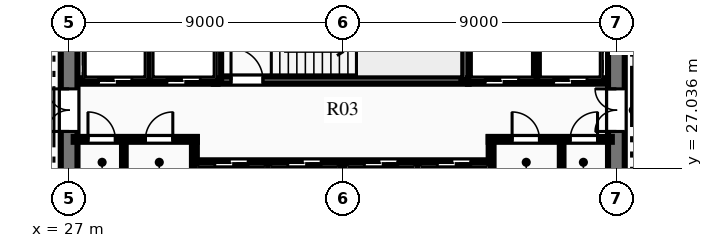
"""IFC4 building model, lengths in metres.
Left out: names, types, materials, properties, quantities, classifications, styles, units other than length and angle.
Written with IfcOpenShell. Run it as: python <this file> out.ifc"""

import sys

from ifc_helpers import new_model, si_unit, direction, frame, frame_2d, origin, place, context, subcontext, project, spatial, rectangle, extrude, element, fill, save


model = new_model("IFC4")
c1 = context("Model", 3, precision=1e-05, world=origin(), true_north=direction((0.0, 1.0)))
c2 = subcontext(c1, "Body", "Model", "MODEL_VIEW")
j1 = project(units=[si_unit("LENGTHUNIT", "METRE"), si_unit("PLANEANGLEUNIT", "RADIAN")], contexts=[c1])
p1 = place(None, origin())
s1 = spatial("IfcSite", under=j1, at=p1, CompositionType="ELEMENT")
p2 = place(p1, origin())
s2 = spatial("IfcBuilding", under=s1, at=p2, CompositionType="ELEMENT")
p3 = place(p2, frame((0.0, 0.0, 90.45)))
s3 = spatial("IfcBuildingStorey", under=s2, at=p3, CompositionType="ELEMENT", Elevation=90.45)
p4 = place(p3, frame((27.0, 18.275, 0.0), z_axis=(0.0, 0.0, 1.0), x_axis=(0.0, 1.0, 0.0)))
e1 = element("IfcWall", 1, at=p4, inside=s3, PredefinedType="SHEAR", context=c2, shape_type="SweptSolid", body=[
    extrude(rectangle(XDim=15.45, YDim=0.55, at=frame_2d((7.725, 0.0))), origin(), (0.0, 0.0, 1.0), 3.75),
])
p5 = place(p4, frame((9.965, 0.0, 0.0)))
e2 = element("IfcOpeningElement", 2, at=p5, cuts=e1, PredefinedType="OPENING", context=c2, shape_type="SweptSolid", body=[
    extrude(rectangle(XDim=1.4, YDim=2.2, at=frame_2d((0.7, 1.1))), frame((0.0, 0.285, 0.0), z_axis=(0.0, -1.0, 0.0), x_axis=(1.0, 0.0, 0.0)), (0.0, 0.0, 1.0), 0.57),
])
p6 = place(p3, frame((45.0, 18.275, 0.0), z_axis=(0.0, 0.0, 1.0), x_axis=(0.0, 1.0, 0.0)))
e3 = element("IfcWall", 3, at=p6, inside=s3, PredefinedType="SHEAR", context=c2, shape_type="SweptSolid", body=[
    extrude(rectangle(XDim=15.45, YDim=0.55, at=frame_2d((7.725, 0.0))), origin(), (0.0, 0.0, 1.0), 3.75),
])
p7 = place(p6, frame((9.965, 0.0, 0.0)))
e4 = element("IfcOpeningElement", 4, at=p7, cuts=e3, PredefinedType="OPENING", context=c2, shape_type="SweptSolid", body=[
    extrude(rectangle(XDim=1.4, YDim=2.2, at=frame_2d((0.7, 1.1))), frame((0.0, 0.285, 0.0), z_axis=(0.0, -1.0, 0.0), x_axis=(1.0, 0.0, 0.0)), (0.0, 0.0, 1.0), 0.57),
])
p8 = place(p3, frame((31.76, 29.93, 0.0), z_axis=(0.0, 0.0, 1.0), x_axis=(1.0, 0.0, 0.0)))
e5 = element("IfcWall", 5, at=p8, inside=s3, PredefinedType="SHEAR", context=c2, shape_type="SweptSolid", body=[
    extrude(rectangle(XDim=8.38, YDim=0.24, at=frame_2d((4.19, 0.0))), origin(), (0.0, 0.0, 1.0), 3.75),
])
p9 = place(p8, frame((0.565, 0.0, 0.0)))
e6 = element("IfcOpeningElement", 6, at=p9, cuts=e5, PredefinedType="OPENING", context=c2, shape_type="SweptSolid", body=[
    extrude(rectangle(XDim=1.05, YDim=2.15, at=frame_2d((0.525, 1.075))), frame((0.0, 0.13, 0.0), z_axis=(0.0, -1.0, 0.0), x_axis=(1.0, 0.0, 0.0)), (0.0, 0.0, 1.0), 0.26),
])
p10 = place(p3, frame((31.88, 29.93, 0.0), z_axis=(0.0, 0.0, 1.0), x_axis=(0.0, 1.0, 0.0)))
e7 = element("IfcWall", 7, at=p10, inside=s3, PredefinedType="SHEAR", context=c2, shape_type="SweptSolid", body=[
    extrude(rectangle(XDim=3.79, YDim=0.24, at=frame_2d((1.895, 0.0))), origin(), (0.0, 0.0, 1.0), 3.75),
])
p11 = place(p3, frame((40.02, 29.93, 0.0), z_axis=(0.0, 0.0, 1.0), x_axis=(0.0, 1.0, 0.0)))
e8 = element("IfcWall", 8, at=p11, inside=s3, PredefinedType="SHEAR", context=c2, shape_type="SweptSolid", body=[
    extrude(rectangle(XDim=3.85, YDim=0.24, at=frame_2d((1.925, 0.0))), origin(), (0.0, 0.0, 1.0), 3.75),
])
p12 = place(p3, frame((27.15, 27.98, 0.0), z_axis=(0.0, 0.0, 1.0), x_axis=(1.0, 0.0, 0.0)))
e9 = element("IfcWall", 9, at=p12, inside=s3, PredefinedType="PARTITIONING", context=c2, shape_type="SweptSolid", body=[
    extrude(rectangle(XDim=4.05, YDim=0.16, at=frame_2d((2.025, 0.0))), origin(), (0.0, 0.0, 1.0), 3.45),
])
p13 = place(p12, frame((0.47, 0.0, 0.0)))
e10 = element("IfcOpeningElement", 10, at=p13, cuts=e9, PredefinedType="OPENING", context=c2, shape_type="SweptSolid", body=[
    extrude(rectangle(XDim=0.9, YDim=2.15, at=frame_2d((0.45, 1.075))), frame((0.0, 0.09, 0.0), z_axis=(0.0, -1.0, 0.0), x_axis=(1.0, 0.0, 0.0)), (0.0, 0.0, 1.0), 0.18),
])
p14 = place(p12, frame((2.36, 0.0, 0.0)))
e11 = element("IfcOpeningElement", 11, at=p14, cuts=e9, PredefinedType="OPENING", context=c2, shape_type="SweptSolid", body=[
    extrude(rectangle(XDim=0.9, YDim=2.15, at=frame_2d((0.45, 1.075))), frame((0.0, 0.09, 0.0), z_axis=(0.0, -1.0, 0.0), x_axis=(1.0, 0.0, 0.0)), (0.0, 0.0, 1.0), 0.18),
])
p15 = place(p3, frame((31.12, 26.54, 0.0), z_axis=(0.0, 0.0, 1.0), x_axis=(0.0, 1.0, 0.0)))
e12 = element("IfcWall", 12, at=p15, inside=s3, PredefinedType="PARTITIONING", context=c2, shape_type="SweptSolid", body=[
    extrude(rectangle(XDim=1.51, YDim=0.16, at=frame_2d((0.755, 0.0))), origin(), (0.0, 0.0, 1.0), 3.45),
])
p16 = place(p3, frame((40.8, 27.98, 0.0), z_axis=(0.0, 0.0, 1.0), x_axis=(1.0, 0.0, 0.0)))
e13 = element("IfcWall", 13, at=p16, inside=s3, PredefinedType="PARTITIONING", context=c2, shape_type="SweptSolid", body=[
    extrude(rectangle(XDim=4.05, YDim=0.16, at=frame_2d((2.025, 0.0))), origin(), (0.0, 0.0, 1.0), 3.45),
])
p17 = place(p16, frame((0.77, 0.0, 0.0)))
e14 = element("IfcOpeningElement", 14, at=p17, cuts=e13, PredefinedType="OPENING", context=c2, shape_type="SweptSolid", body=[
    extrude(rectangle(XDim=0.9, YDim=2.15, at=frame_2d((0.45, 1.075))), frame((0.0, 0.09, 0.0), z_axis=(0.0, -1.0, 0.0), x_axis=(1.0, 0.0, 0.0)), (0.0, 0.0, 1.0), 0.18),
])
p18 = place(p16, frame((2.68, 0.0, 0.0)))
e15 = element("IfcOpeningElement", 15, at=p18, cuts=e13, PredefinedType="OPENING", context=c2, shape_type="SweptSolid", body=[
    extrude(rectangle(XDim=0.9, YDim=2.15, at=frame_2d((0.45, 1.075))), frame((0.0, 0.09, 0.0), z_axis=(0.0, -1.0, 0.0), x_axis=(1.0, 0.0, 0.0)), (0.0, 0.0, 1.0), 0.18),
])
p19 = place(p3, frame((40.88, 26.54, 0.0), z_axis=(0.0, 0.0, 1.0), x_axis=(0.0, 1.0, 0.0)))
e16 = element("IfcWall", 16, at=p19, inside=s3, PredefinedType="PARTITIONING", context=c2, shape_type="SweptSolid", body=[
    extrude(rectangle(XDim=1.51, YDim=0.16, at=frame_2d((0.755, 0.0))), origin(), (0.0, 0.0, 1.0), 3.45),
])
for number, where, z_axis, x_axis in (
    (17, (28.8, 26.54, 0.0), (0.0, 0.0, 1.0), (0.0, 1.0, 0.0)),
    (18, (43.2, 26.54, 0.0), (0.0, 0.0, 1.0), (0.0, 1.0, 0.0)),
):
    element("IfcWall", number, at=place(p3, frame(where, z_axis=z_axis, x_axis=x_axis)), inside=s3, PredefinedType="PARTITIONING", context=c2, shape_type="SweptSolid", body=[
        extrude(rectangle(XDim=1.44, YDim=0.12, at=frame_2d((0.72, 0.0))), origin(), (0.0, 0.0, 1.0), 3.45),
    ])
p20 = place(p3, frame((27.45, 29.9, 0.0), z_axis=(0.0, 0.0, 1.0), x_axis=(1.0, 0.0, 0.0)))
e19 = element("IfcWall", 19, at=p20, inside=s3, PredefinedType="PARTITIONING", context=c2, shape_type="SweptSolid", body=[
    extrude(rectangle(XDim=4.43, YDim=0.18, at=frame_2d((2.215, 0.0))), origin(), (0.0, 0.0, 1.0), 3.45),
])
p21 = place(p20, frame((0.515, 0.0, 0.0)))
e20 = element("IfcOpeningElement", 20, at=p21, cuts=e19, PredefinedType="OPENING", context=c2, shape_type="SweptSolid", body=[
    extrude(rectangle(XDim=1.1, YDim=2.15, at=frame_2d((0.55, 1.075))), frame((0.0, 0.1, 0.0), z_axis=(0.0, -1.0, 0.0), x_axis=(1.0, 0.0, 0.0)), (0.0, 0.0, 1.0), 0.2),
])
p22 = place(p20, frame((2.765, 0.0, 0.0)))
e21 = element("IfcOpeningElement", 21, at=p22, cuts=e19, PredefinedType="OPENING", context=c2, shape_type="SweptSolid", body=[
    extrude(rectangle(XDim=1.1, YDim=2.15, at=frame_2d((0.55, 1.075))), frame((0.0, 0.1, 0.0), z_axis=(0.0, -1.0, 0.0), x_axis=(1.0, 0.0, 0.0)), (0.0, 0.0, 1.0), 0.2),
])
p23 = place(p3, frame((29.63, 29.9, 0.0), z_axis=(0.0, 0.0, 1.0), x_axis=(0.0, 1.0, 0.0)))
e22 = element("IfcWall", 22, at=p23, inside=s3, PredefinedType="PARTITIONING", context=c2, shape_type="SweptSolid", body=[
    extrude(rectangle(XDim=3.75, YDim=0.18, at=frame_2d((1.875, 0.0))), origin(), (0.0, 0.0, 1.0), 3.45),
])
p24 = place(p3, frame((40.12, 29.9, 0.0), z_axis=(0.0, 0.0, 1.0), x_axis=(1.0, 0.0, 0.0)))
e23 = element("IfcWall", 23, at=p24, inside=s3, PredefinedType="PARTITIONING", context=c2, shape_type="SweptSolid", body=[
    extrude(rectangle(XDim=4.43, YDim=0.18, at=frame_2d((2.215, 0.0))), origin(), (0.0, 0.0, 1.0), 3.45),
])
p25 = place(p24, frame((0.565, 0.0, 0.0)))
e24 = element("IfcOpeningElement", 24, at=p25, cuts=e23, PredefinedType="OPENING", context=c2, shape_type="SweptSolid", body=[
    extrude(rectangle(XDim=1.1, YDim=2.15, at=frame_2d((0.55, 1.075))), frame((0.0, 0.1, 0.0), z_axis=(0.0, -1.0, 0.0), x_axis=(1.0, 0.0, 0.0)), (0.0, 0.0, 1.0), 0.2),
])
p26 = place(p24, frame((2.815, 0.0, 0.0)))
e25 = element("IfcOpeningElement", 25, at=p26, cuts=e23, PredefinedType="OPENING", context=c2, shape_type="SweptSolid", body=[
    extrude(rectangle(XDim=1.1, YDim=2.15, at=frame_2d((0.55, 1.075))), frame((0.0, 0.1, 0.0), z_axis=(0.0, -1.0, 0.0), x_axis=(1.0, 0.0, 0.0)), (0.0, 0.0, 1.0), 0.2),
])
p27 = place(p3, frame((42.37, 29.9, 0.0), z_axis=(0.0, 0.0, 1.0), x_axis=(0.0, 1.0, 0.0)))
e26 = element("IfcWall", 26, at=p27, inside=s3, PredefinedType="PARTITIONING", context=c2, shape_type="SweptSolid", body=[
    extrude(rectangle(XDim=3.75, YDim=0.18, at=frame_2d((1.875, 0.0))), origin(), (0.0, 0.0, 1.0), 3.45),
])
p28 = place(p3, frame((31.2, 27.2, 0.0), z_axis=(0.0, 0.0, 1.0), x_axis=(1.0, 0.0, 0.0)))
e27 = element("IfcWall", 27, at=p28, inside=s3, PredefinedType="PARTITIONING", context=c2, shape_type="SweptSolid", body=[
    extrude(rectangle(XDim=9.6, YDim=0.18, at=frame_2d((4.8, 0.0))), origin(), (0.0, 0.0, 1.0), 3.45),
])
p29 = place(p28, frame((0.59, 0.0, 0.0)))
e28 = element("IfcOpeningElement", 28, at=p29, cuts=e27, PredefinedType="OPENING", context=c2, shape_type="SweptSolid", body=[
    extrude(rectangle(XDim=1.1, YDim=2.15, at=frame_2d((0.55, 1.075))), frame((0.0, 0.1, 0.0), z_axis=(0.0, -1.0, 0.0), x_axis=(1.0, 0.0, 0.0)), (0.0, 0.0, 1.0), 0.2),
])
p30 = place(p28, frame((2.99, 0.0, 0.0)))
e29 = element("IfcOpeningElement", 29, at=p30, cuts=e27, PredefinedType="OPENING", context=c2, shape_type="SweptSolid", body=[
    extrude(rectangle(XDim=1.1, YDim=2.15, at=frame_2d((0.55, 1.075))), frame((0.0, 0.1, 0.0), z_axis=(0.0, -1.0, 0.0), x_axis=(1.0, 0.0, 0.0)), (0.0, 0.0, 1.0), 0.2),
])
p31 = place(p28, frame((5.51, 0.0, 0.0)))
e30 = element("IfcOpeningElement", 30, at=p31, cuts=e27, PredefinedType="OPENING", context=c2, shape_type="SweptSolid", body=[
    extrude(rectangle(XDim=1.1, YDim=2.15, at=frame_2d((0.55, 1.075))), frame((0.0, 0.1, 0.0), z_axis=(0.0, -1.0, 0.0), x_axis=(1.0, 0.0, 0.0)), (0.0, 0.0, 1.0), 0.2),
])
p32 = place(p28, frame((7.91, 0.0, 0.0)))
e31 = element("IfcOpeningElement", 31, at=p32, cuts=e27, PredefinedType="OPENING", context=c2, shape_type="SweptSolid", body=[
    extrude(rectangle(XDim=1.1, YDim=2.15, at=frame_2d((0.55, 1.075))), frame((0.0, 0.1, 0.0), z_axis=(0.0, -1.0, 0.0), x_axis=(1.0, 0.0, 0.0)), (0.0, 0.0, 1.0), 0.2),
])
for number, where, z_axis, x_axis in (
    (32, (33.54, 25.3, 0.0), (0.0, 0.0, 1.0), (0.0, 1.0, 0.0)),
    (33, (36.0, 25.3, 0.0), (0.0, 0.0, 1.0), (0.0, 1.0, 0.0)),
    (34, (38.46, 25.3, 0.0), (0.0, 0.0, 1.0), (0.0, 1.0, 0.0)),
):
    element("IfcWall", number, at=place(p3, frame(where, z_axis=z_axis, x_axis=x_axis)), inside=s3, PredefinedType="PARTITIONING", context=c2, shape_type="SweptSolid", body=[
        extrude(rectangle(XDim=1.9, YDim=0.18, at=frame_2d((0.95, 0.0))), origin(), (0.0, 0.0, 1.0), 3.45),
    ])
p33 = place(p13, origin())
e35 = element("IfcDoor", 35, at=p33, inside=s3, OperationType="SINGLE_SWING_LEFT", PredefinedType="DOOR", context=c2, shape_type="SweptSolid", body=[
    extrude(rectangle(XDim=0.9, YDim=2.15, at=frame_2d((0.45, 1.075))), frame((0.0, 0.025, 0.0), z_axis=(0.0, -1.0, 0.0), x_axis=(1.0, 0.0, 0.0)), (0.0, 0.0, 1.0), 0.05),
])
fill(e10, e35)
p34 = place(p14, origin())
e36 = element("IfcDoor", 36, at=p34, inside=s3, OperationType="SINGLE_SWING_RIGHT", PredefinedType="DOOR", context=c2, shape_type="SweptSolid", body=[
    extrude(rectangle(XDim=0.9, YDim=2.15, at=frame_2d((0.45, 1.075))), frame((0.0, 0.025, 0.0), z_axis=(0.0, -1.0, 0.0), x_axis=(1.0, 0.0, 0.0)), (0.0, 0.0, 1.0), 0.05),
])
fill(e11, e36)
p35 = place(p17, origin())
e37 = element("IfcDoor", 37, at=p35, inside=s3, OperationType="SINGLE_SWING_LEFT", PredefinedType="DOOR", context=c2, shape_type="SweptSolid", body=[
    extrude(rectangle(XDim=0.9, YDim=2.15, at=frame_2d((0.45, 1.075))), frame((0.0, 0.025, 0.0), z_axis=(0.0, -1.0, 0.0), x_axis=(1.0, 0.0, 0.0)), (0.0, 0.0, 1.0), 0.05),
])
fill(e14, e37)
p36 = place(p18, origin())
e38 = element("IfcDoor", 38, at=p36, inside=s3, OperationType="SINGLE_SWING_RIGHT", PredefinedType="DOOR", context=c2, shape_type="SweptSolid", body=[
    extrude(rectangle(XDim=0.9, YDim=2.15, at=frame_2d((0.45, 1.075))), frame((0.0, 0.025, 0.0), z_axis=(0.0, -1.0, 0.0), x_axis=(1.0, 0.0, 0.0)), (0.0, 0.0, 1.0), 0.05),
])
fill(e15, e38)
p37 = place(p9, origin())
e39 = element("IfcDoor", 39, at=p37, inside=s3, OperationType="SINGLE_SWING_LEFT", PredefinedType="DOOR", context=c2, shape_type="SweptSolid", body=[
    extrude(rectangle(XDim=1.05, YDim=2.15, at=frame_2d((0.525, 1.075))), frame((0.0, 0.025, 0.0), z_axis=(0.0, -1.0, 0.0), x_axis=(1.0, 0.0, 0.0)), (0.0, 0.0, 1.0), 0.05),
])
fill(e6, e39)
p38 = place(p5, origin())
e40 = element("IfcDoor", 40, at=p38, inside=s3, OperationType="DOUBLE_DOOR_SINGLE_SWING", PredefinedType="DOOR", context=c2, shape_type="SweptSolid", body=[
    extrude(rectangle(XDim=1.4, YDim=2.2, at=frame_2d((0.7, 1.1))), frame((0.0, 0.025, 0.0), z_axis=(0.0, -1.0, 0.0), x_axis=(1.0, 0.0, 0.0)), (0.0, 0.0, 1.0), 0.05),
])
fill(e2, e40)
p39 = place(p7, origin())
e41 = element("IfcDoor", 41, at=p39, inside=s3, OperationType="DOUBLE_DOOR_SINGLE_SWING", PredefinedType="DOOR", context=c2, shape_type="SweptSolid", body=[
    extrude(rectangle(XDim=1.4, YDim=2.2, at=frame_2d((0.7, 1.1))), frame((0.0, 0.025, 0.0), z_axis=(0.0, -1.0, 0.0), x_axis=(1.0, 0.0, 0.0)), (0.0, 0.0, 1.0), 0.05),
])
fill(e4, e41)
p40 = place(p21, origin())
e42 = element("IfcDoor", 42, at=p40, inside=s3, OperationType="SLIDING_TO_LEFT", PredefinedType="DOOR", context=c2, shape_type="SweptSolid", body=[
    extrude(rectangle(XDim=1.1, YDim=2.15, at=frame_2d((0.55, 1.075))), frame((0.0, 0.025, 0.0), z_axis=(0.0, -1.0, 0.0), x_axis=(1.0, 0.0, 0.0)), (0.0, 0.0, 1.0), 0.05),
])
fill(e20, e42)
p41 = place(p22, origin())
e43 = element("IfcDoor", 43, at=p41, inside=s3, OperationType="SLIDING_TO_LEFT", PredefinedType="DOOR", context=c2, shape_type="SweptSolid", body=[
    extrude(rectangle(XDim=1.1, YDim=2.15, at=frame_2d((0.55, 1.075))), frame((0.0, 0.025, 0.0), z_axis=(0.0, -1.0, 0.0), x_axis=(1.0, 0.0, 0.0)), (0.0, 0.0, 1.0), 0.05),
])
fill(e21, e43)
p42 = place(p25, origin())
e44 = element("IfcDoor", 44, at=p42, inside=s3, OperationType="SLIDING_TO_LEFT", PredefinedType="DOOR", context=c2, shape_type="SweptSolid", body=[
    extrude(rectangle(XDim=1.1, YDim=2.15, at=frame_2d((0.55, 1.075))), frame((0.0, 0.025, 0.0), z_axis=(0.0, -1.0, 0.0), x_axis=(1.0, 0.0, 0.0)), (0.0, 0.0, 1.0), 0.05),
])
fill(e24, e44)
p43 = place(p26, origin())
e45 = element("IfcDoor", 45, at=p43, inside=s3, OperationType="SLIDING_TO_LEFT", PredefinedType="DOOR", context=c2, shape_type="SweptSolid", body=[
    extrude(rectangle(XDim=1.1, YDim=2.15, at=frame_2d((0.55, 1.075))), frame((0.0, 0.025, 0.0), z_axis=(0.0, -1.0, 0.0), x_axis=(1.0, 0.0, 0.0)), (0.0, 0.0, 1.0), 0.05),
])
fill(e25, e45)
p44 = place(p29, origin())
e46 = element("IfcDoor", 46, at=p44, inside=s3, OperationType="SLIDING_TO_LEFT", PredefinedType="DOOR", context=c2, shape_type="SweptSolid", body=[
    extrude(rectangle(XDim=1.1, YDim=2.15, at=frame_2d((0.55, 1.075))), frame((0.0, 0.025, 0.0), z_axis=(0.0, -1.0, 0.0), x_axis=(1.0, 0.0, 0.0)), (0.0, 0.0, 1.0), 0.05),
])
fill(e28, e46)
p45 = place(p30, origin())
e47 = element("IfcDoor", 47, at=p45, inside=s3, OperationType="SLIDING_TO_LEFT", PredefinedType="DOOR", context=c2, shape_type="SweptSolid", body=[
    extrude(rectangle(XDim=1.1, YDim=2.15, at=frame_2d((0.55, 1.075))), frame((0.0, 0.025, 0.0), z_axis=(0.0, -1.0, 0.0), x_axis=(1.0, 0.0, 0.0)), (0.0, 0.0, 1.0), 0.05),
])
fill(e29, e47)
p46 = place(p31, origin())
e48 = element("IfcDoor", 48, at=p46, inside=s3, OperationType="SLIDING_TO_LEFT", PredefinedType="DOOR", context=c2, shape_type="SweptSolid", body=[
    extrude(rectangle(XDim=1.1, YDim=2.15, at=frame_2d((0.55, 1.075))), frame((0.0, 0.025, 0.0), z_axis=(0.0, -1.0, 0.0), x_axis=(1.0, 0.0, 0.0)), (0.0, 0.0, 1.0), 0.05),
])
fill(e30, e48)
p47 = place(p32, origin())
e49 = element("IfcDoor", 49, at=p47, inside=s3, OperationType="SLIDING_TO_LEFT", PredefinedType="DOOR", context=c2, shape_type="SweptSolid", body=[
    extrude(rectangle(XDim=1.1, YDim=2.15, at=frame_2d((0.55, 1.075))), frame((0.0, 0.025, 0.0), z_axis=(0.0, -1.0, 0.0), x_axis=(1.0, 0.0, 0.0)), (0.0, 0.0, 1.0), 0.05),
])
fill(e31, e49)
save(model, sys.argv[1])
